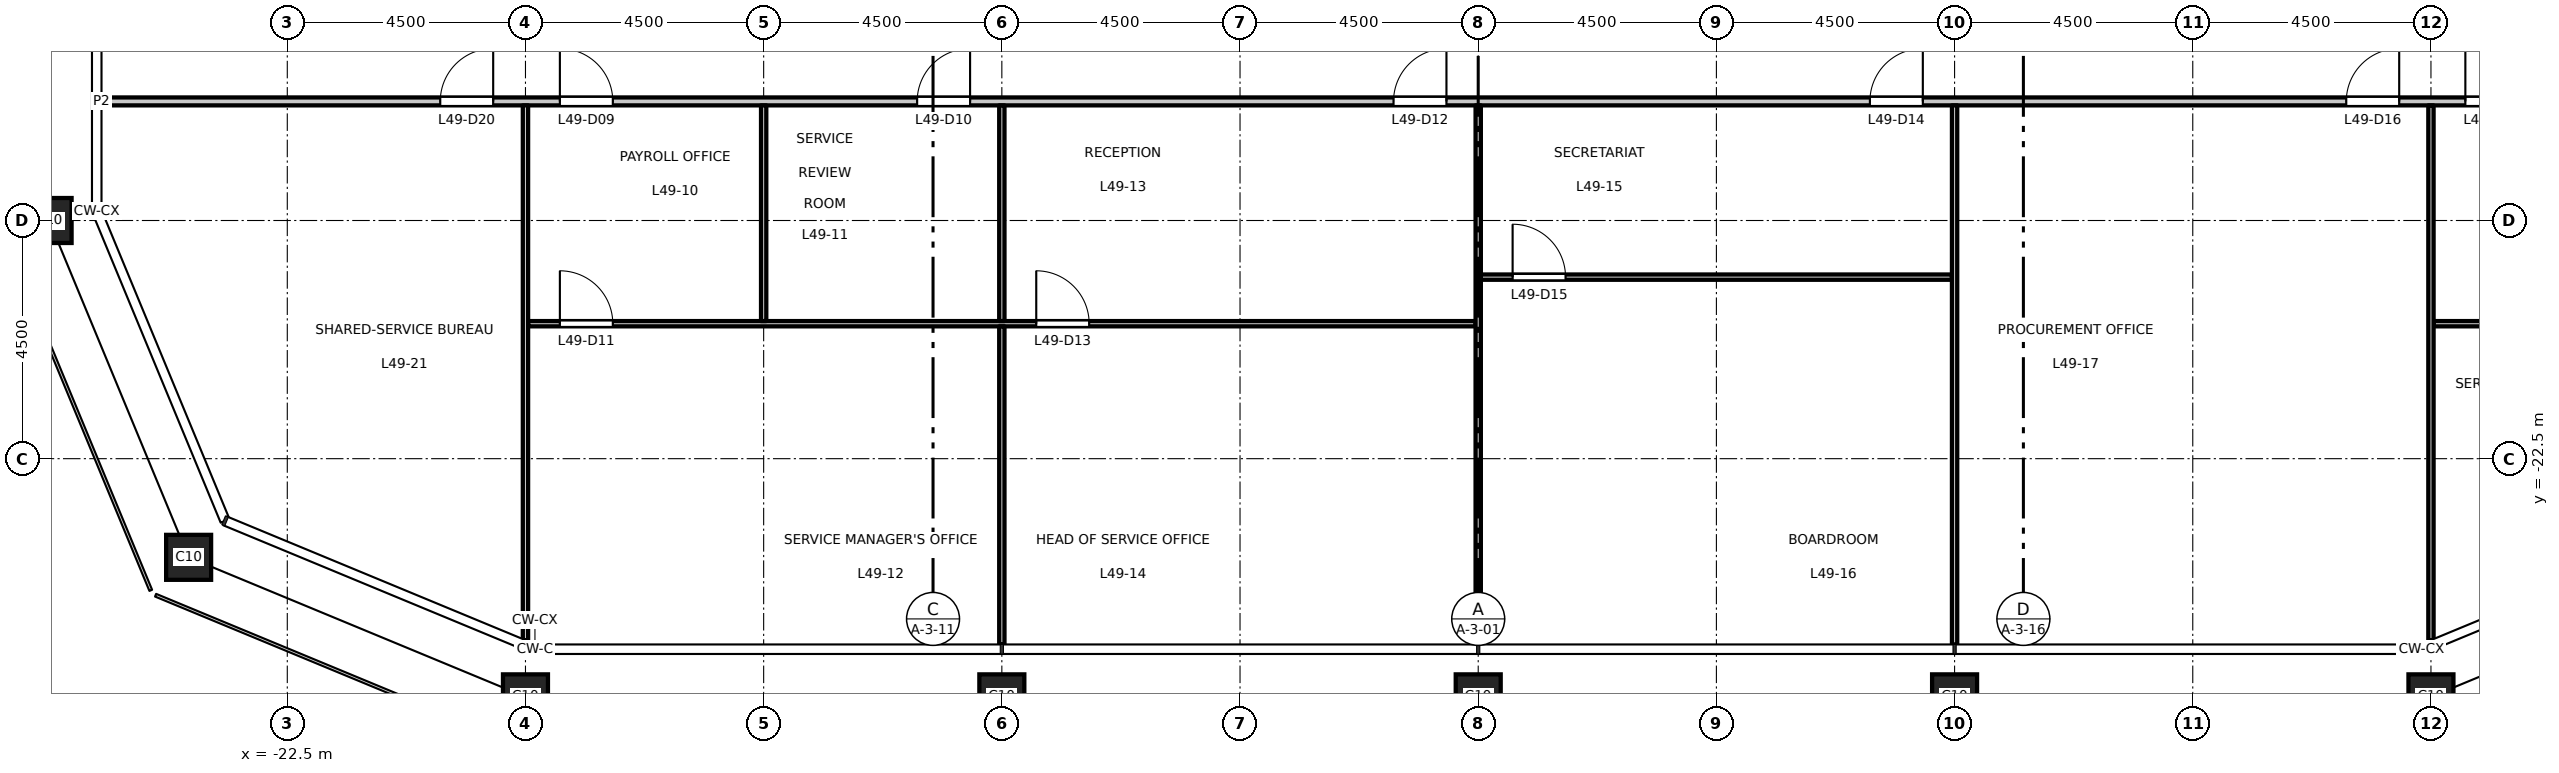
"""IFC4 building model, lengths in metres.
Left out: names, types, materials, properties, quantities, classifications, styles, units other than length and angle.
Written with IfcOpenShell. Run it as: python <this file> out.ifc"""

import sys

from ifc_helpers import new_model, si_unit, direction, frame, frame_2d, origin, origin_2d, place, context, subcontext, project, spatial, rectangle, hollow_rectangle, extrude, element, fill, save


model = new_model("IFC4")
c1 = context("Model", 3, precision=1e-05, world=origin(), true_north=direction((0.0, 1.0)))
c2 = subcontext(c1, "Body", "Model", "MODEL_VIEW")
j1 = project(units=[si_unit("LENGTHUNIT", "METRE"), si_unit("PLANEANGLEUNIT", "RADIAN")], contexts=[c1])
p1 = place(None, origin())
s1 = spatial("IfcSite", under=j1, at=p1, CompositionType="ELEMENT")
p2 = place(p1, origin())
s2 = spatial("IfcBuilding", under=s1, at=p2, CompositionType="ELEMENT")
p3 = place(p2, frame((0.0, 0.0, 228.7)))
s3 = spatial("IfcBuildingStorey", under=s2, at=p3, CompositionType="ELEMENT", Elevation=228.7)
for number, where, z_axis, x_axis in (
    (1, (-18.0, -27.0, 0.0), (0.0, 0.0, 1.0), (1.0, 0.0, 0.0)),
    (2, (-9.0, -27.0, 0.0), (0.0, 0.0, 1.0), (1.0, 0.0, 0.0)),
    (3, (0.0, -27.0, 0.0), (0.0, 0.0, 1.0), (1.0, 0.0, 0.0)),
    (4, (9.0, -27.0, 0.0), (0.0, 0.0, 1.0), (1.0, 0.0, 0.0)),
    (5, (18.0, -27.0, 0.0), (0.0, 0.0, 1.0), (1.0, 0.0, 0.0)),
    (6, (-27.0, -18.0, 0.0), (0.0, 0.0, 1.0), (1.0, 0.0, 0.0)),
    (7, (-24.364, -24.364, 0.0), (0.0, 0.0, 1.0), (1.0, 0.0, 0.0)),
):
    element("IfcColumn", number, at=place(p3, frame(where, z_axis=z_axis, x_axis=x_axis)), inside=s3, PredefinedType="COLUMN", context=c2, shape_type="SweptSolid", body=[
        extrude(hollow_rectangle(XDim=0.85, YDim=0.85, WallThickness=0.05, at=origin_2d()), origin(), (0.0, 0.0, 1.0), 4.5),
    ])
p4 = place(p3, frame((-17.95, -19.95, 0.0), z_axis=(0.0, 0.0, 1.0), x_axis=(1.0, 0.0, 0.0)))
e8 = element("IfcWall", 8, at=p4, inside=s3, PredefinedType="PARTITIONING", context=c2, shape_type="SweptSolid", body=[
    extrude(rectangle(XDim=17.9, YDim=0.1, at=frame_2d((8.95, 0.0))), origin(), (0.0, 0.0, 1.0), 4.35),
])
p5 = place(p4, frame((0.6, 0.0, 0.0)))
e9 = element("IfcOpeningElement", 9, at=p5, cuts=e8, PredefinedType="OPENING", context=c2, shape_type="SweptSolid", body=[
    extrude(rectangle(XDim=1.0, YDim=2.1, at=frame_2d((0.5, 1.05))), frame((0.0, 0.06, 0.0), z_axis=(0.0, -1.0, 0.0), x_axis=(1.0, 0.0, 0.0)), (0.0, 0.0, 1.0), 0.12),
])
p6 = place(p4, frame((9.6, 0.0, 0.0)))
e10 = element("IfcOpeningElement", 10, at=p6, cuts=e8, PredefinedType="OPENING", context=c2, shape_type="SweptSolid", body=[
    extrude(rectangle(XDim=1.0, YDim=2.1, at=frame_2d((0.5, 1.05))), frame((0.0, 0.06, 0.0), z_axis=(0.0, -1.0, 0.0), x_axis=(1.0, 0.0, 0.0)), (0.0, 0.0, 1.0), 0.12),
])
p7 = place(p3, frame((18.05, -19.95, 0.0), z_axis=(0.0, 0.0, 1.0), x_axis=(1.0, 0.0, 0.0)))
e11 = element("IfcWall", 11, at=p7, inside=s3, PredefinedType="PARTITIONING", context=c2, shape_type="SweptSolid", body=[
    extrude(rectangle(XDim=7.071, YDim=0.1, at=frame_2d((3.536, 0.0))), origin(), (0.0, 0.0, 1.0), 4.35),
])
p8 = place(p7, frame((5.35, 0.0, 0.0)))
e12 = element("IfcOpeningElement", 12, at=p8, cuts=e11, PredefinedType="OPENING", context=c2, shape_type="SweptSolid", body=[
    extrude(rectangle(XDim=1.0, YDim=2.1, at=frame_2d((0.5, 1.05))), frame((0.0, 0.06, 0.0), z_axis=(0.0, -1.0, 0.0), x_axis=(1.0, 0.0, 0.0)), (0.0, 0.0, 1.0), 0.12),
])
p9 = place(p3, frame((0.05, -19.07, 0.0), z_axis=(0.0, 0.0, 1.0), x_axis=(1.0, 0.0, 0.0)))
e13 = element("IfcWall", 13, at=p9, inside=s3, PredefinedType="PARTITIONING", context=c2, shape_type="SweptSolid", body=[
    extrude(rectangle(XDim=8.9, YDim=0.1, at=frame_2d((4.45, 0.0))), origin(), (0.0, 0.0, 1.0), 4.35),
])
p10 = place(p9, frame((0.6, 0.0, 0.0)))
e14 = element("IfcOpeningElement", 14, at=p10, cuts=e13, PredefinedType="OPENING", context=c2, shape_type="SweptSolid", body=[
    extrude(rectangle(XDim=1.0, YDim=2.1, at=frame_2d((0.5, 1.05))), frame((0.0, 0.06, 0.0), z_axis=(0.0, -1.0, 0.0), x_axis=(1.0, 0.0, 0.0)), (0.0, 0.0, 1.0), 0.12),
])
p11 = place(p3, frame((-26.01, -15.75, 0.0), z_axis=(0.0, 0.0, 1.0), x_axis=(1.0, 0.0, 0.0)))
e15 = element("IfcWall", 15, at=p11, inside=s3, PredefinedType="PARTITIONING", context=c2, shape_type="SweptSolid", body=[
    extrude(rectangle(XDim=52.02, YDim=0.15, at=frame_2d((26.01, 0.0))), origin(), (0.0, 0.0, 1.0), 4.35),
])
p12 = place(p11, frame((8.66, 0.0, 0.0)))
e16 = element("IfcOpeningElement", 16, at=p12, cuts=e15, PredefinedType="OPENING", context=c2, shape_type="SweptSolid", body=[
    extrude(rectangle(XDim=1.0, YDim=2.1, at=frame_2d((0.5, 1.05))), frame((0.0, 0.085, 0.0), z_axis=(0.0, -1.0, 0.0), x_axis=(1.0, 0.0, 0.0)), (0.0, 0.0, 1.0), 0.17),
])
p13 = place(p11, frame((15.41, 0.0, 0.0)))
e17 = element("IfcOpeningElement", 17, at=p13, cuts=e15, PredefinedType="OPENING", context=c2, shape_type="SweptSolid", body=[
    extrude(rectangle(XDim=1.0, YDim=2.1, at=frame_2d((0.5, 1.05))), frame((0.0, 0.085, 0.0), z_axis=(0.0, -1.0, 0.0), x_axis=(1.0, 0.0, 0.0)), (0.0, 0.0, 1.0), 0.17),
])
p14 = place(p11, frame((24.41, 0.0, 0.0)))
e18 = element("IfcOpeningElement", 18, at=p14, cuts=e15, PredefinedType="OPENING", context=c2, shape_type="SweptSolid", body=[
    extrude(rectangle(XDim=1.0, YDim=2.1, at=frame_2d((0.5, 1.05))), frame((0.0, 0.085, 0.0), z_axis=(0.0, -1.0, 0.0), x_axis=(1.0, 0.0, 0.0)), (0.0, 0.0, 1.0), 0.17),
])
p15 = place(p11, frame((33.41, 0.0, 0.0)))
e19 = element("IfcOpeningElement", 19, at=p15, cuts=e15, PredefinedType="OPENING", context=c2, shape_type="SweptSolid", body=[
    extrude(rectangle(XDim=1.0, YDim=2.1, at=frame_2d((0.5, 1.05))), frame((0.0, 0.085, 0.0), z_axis=(0.0, -1.0, 0.0), x_axis=(1.0, 0.0, 0.0)), (0.0, 0.0, 1.0), 0.17),
])
p16 = place(p11, frame((42.41, 0.0, 0.0)))
e20 = element("IfcOpeningElement", 20, at=p16, cuts=e15, PredefinedType="OPENING", context=c2, shape_type="SweptSolid", body=[
    extrude(rectangle(XDim=1.0, YDim=2.1, at=frame_2d((0.5, 1.05))), frame((0.0, 0.085, 0.0), z_axis=(0.0, -1.0, 0.0), x_axis=(1.0, 0.0, 0.0)), (0.0, 0.0, 1.0), 0.17),
])
p17 = place(p11, frame((6.4, 0.0, 0.0)))
e21 = element("IfcOpeningElement", 21, at=p17, cuts=e15, PredefinedType="OPENING", context=c2, shape_type="SweptSolid", body=[
    extrude(rectangle(XDim=1.0, YDim=2.1, at=frame_2d((0.5, 1.05))), frame((0.0, 0.085, 0.0), z_axis=(0.0, -1.0, 0.0), x_axis=(1.0, 0.0, 0.0)), (0.0, 0.0, 1.0), 0.17),
])
p18 = place(p11, frame((44.66, 0.0, 0.0)))
e22 = element("IfcOpeningElement", 22, at=p18, cuts=e15, PredefinedType="OPENING", context=c2, shape_type="SweptSolid", body=[
    extrude(rectangle(XDim=1.0, YDim=2.1, at=frame_2d((0.5, 1.05))), frame((0.0, 0.085, 0.0), z_axis=(0.0, -1.0, 0.0), x_axis=(1.0, 0.0, 0.0)), (0.0, 0.0, 1.0), 0.17),
])
p19 = place(p3, frame((-18.0, -25.928, 0.0), z_axis=(0.0, 0.0, 1.0), x_axis=(0.0, 1.0, 0.0)))
e23 = element("IfcWall", 23, at=p19, inside=s3, PredefinedType="PARTITIONING", context=c2, shape_type="SweptSolid", body=[
    extrude(rectangle(XDim=10.103, YDim=0.1, at=frame_2d((5.052, 0.0))), origin(), (0.0, 0.0, 1.0), 3.65),
])
p20 = place(p3, frame((-13.5, -19.9, 0.0), z_axis=(0.0, 0.0, 1.0), x_axis=(0.0, 1.0, 0.0)))
e24 = element("IfcWall", 24, at=p20, inside=s3, PredefinedType="PARTITIONING", context=c2, shape_type="SweptSolid", body=[
    extrude(rectangle(XDim=4.075, YDim=0.1, at=frame_2d((2.038, 0.0))), origin(), (0.0, 0.0, 1.0), 4.35),
])
p21 = place(p3, frame((-9.0, -26.01, 0.0), z_axis=(0.0, 0.0, 1.0), x_axis=(0.0, 1.0, 0.0)))
e25 = element("IfcWall", 25, at=p21, inside=s3, PredefinedType="PARTITIONING", context=c2, shape_type="SweptSolid", body=[
    extrude(rectangle(XDim=6.01, YDim=0.1, at=frame_2d((3.005, 0.0))), origin(), (0.0, 0.0, 1.0), 3.65),
])
p22 = place(p3, frame((-9.0, -19.9, 0.0), z_axis=(0.0, 0.0, 1.0), x_axis=(0.0, 1.0, 0.0)))
e26 = element("IfcWall", 26, at=p22, inside=s3, PredefinedType="PARTITIONING", context=c2, shape_type="SweptSolid", body=[
    extrude(rectangle(XDim=4.075, YDim=0.1, at=frame_2d((2.038, 0.0))), origin(), (0.0, 0.0, 1.0), 3.65),
])
p23 = place(p3, frame((0.0, -26.01, 0.0), z_axis=(0.0, 0.0, 1.0), x_axis=(0.0, 1.0, 0.0)))
e27 = element("IfcWall", 27, at=p23, inside=s3, PredefinedType="PARTITIONING", context=c2, shape_type="SweptSolid", body=[
    extrude(rectangle(XDim=10.185, YDim=0.1, at=frame_2d((5.093, 0.0))), origin(), (0.0, 0.0, 1.0), 3.55),
])
p24 = place(p3, frame((9.0, -26.01, 0.0), z_axis=(0.0, 0.0, 1.0), x_axis=(0.0, 1.0, 0.0)))
e28 = element("IfcWall", 28, at=p24, inside=s3, PredefinedType="PARTITIONING", context=c2, shape_type="SweptSolid", body=[
    extrude(rectangle(XDim=10.185, YDim=0.1, at=frame_2d((5.093, 0.0))), origin(), (0.0, 0.0, 1.0), 3.65),
])
p25 = place(p3, frame((18.0, -25.928, 0.0), z_axis=(0.0, 0.0, 1.0), x_axis=(0.0, 1.0, 0.0)))
e29 = element("IfcWall", 29, at=p25, inside=s3, PredefinedType="PARTITIONING", context=c2, shape_type="SweptSolid", body=[
    extrude(rectangle(XDim=10.103, YDim=0.1, at=frame_2d((5.052, 0.0))), origin(), (0.0, 0.0, 1.0), 3.65),
])
p26 = place(p12, origin())
e30 = element("IfcDoor", 30, at=p26, inside=s3, OperationType="SINGLE_SWING_LEFT", PredefinedType="DOOR", context=c2, shape_type="SweptSolid", body=[
    extrude(rectangle(XDim=1.0, YDim=2.1, at=frame_2d((0.5, 1.05))), frame((0.0, 0.025, 0.0), z_axis=(0.0, -1.0, 0.0), x_axis=(1.0, 0.0, 0.0)), (0.0, 0.0, 1.0), 0.05),
])
fill(e16, e30)
p27 = place(p13, origin())
e31 = element("IfcDoor", 31, at=p27, inside=s3, OperationType="SINGLE_SWING_RIGHT", PredefinedType="DOOR", context=c2, shape_type="SweptSolid", body=[
    extrude(rectangle(XDim=1.0, YDim=2.1, at=frame_2d((0.5, 1.05))), frame((0.0, 0.025, 0.0), z_axis=(0.0, -1.0, 0.0), x_axis=(1.0, 0.0, 0.0)), (0.0, 0.0, 1.0), 0.05),
])
fill(e17, e31)
p28 = place(p5, origin())
e32 = element("IfcDoor", 32, at=p28, inside=s3, OperationType="SINGLE_SWING_LEFT", PredefinedType="DOOR", context=c2, shape_type="SweptSolid", body=[
    extrude(rectangle(XDim=1.0, YDim=2.1, at=frame_2d((0.5, 1.05))), frame((0.0, 0.025, 0.0), z_axis=(0.0, -1.0, 0.0), x_axis=(1.0, 0.0, 0.0)), (0.0, 0.0, 1.0), 0.05),
])
fill(e9, e32)
p29 = place(p14, origin())
e33 = element("IfcDoor", 33, at=p29, inside=s3, OperationType="SINGLE_SWING_RIGHT", PredefinedType="DOOR", context=c2, shape_type="SweptSolid", body=[
    extrude(rectangle(XDim=1.0, YDim=2.1, at=frame_2d((0.5, 1.05))), frame((0.0, 0.025, 0.0), z_axis=(0.0, -1.0, 0.0), x_axis=(1.0, 0.0, 0.0)), (0.0, 0.0, 1.0), 0.05),
])
fill(e18, e33)
p30 = place(p6, origin())
e34 = element("IfcDoor", 34, at=p30, inside=s3, OperationType="SINGLE_SWING_LEFT", PredefinedType="DOOR", context=c2, shape_type="SweptSolid", body=[
    extrude(rectangle(XDim=1.0, YDim=2.1, at=frame_2d((0.5, 1.05))), frame((0.0, 0.025, 0.0), z_axis=(0.0, -1.0, 0.0), x_axis=(1.0, 0.0, 0.0)), (0.0, 0.0, 1.0), 0.05),
])
fill(e10, e34)
p31 = place(p15, origin())
e35 = element("IfcDoor", 35, at=p31, inside=s3, OperationType="SINGLE_SWING_RIGHT", PredefinedType="DOOR", context=c2, shape_type="SweptSolid", body=[
    extrude(rectangle(XDim=1.0, YDim=2.1, at=frame_2d((0.5, 1.05))), frame((0.0, 0.025, 0.0), z_axis=(0.0, -1.0, 0.0), x_axis=(1.0, 0.0, 0.0)), (0.0, 0.0, 1.0), 0.05),
])
fill(e19, e35)
p32 = place(p10, origin())
e36 = element("IfcDoor", 36, at=p32, inside=s3, OperationType="SINGLE_SWING_LEFT", PredefinedType="DOOR", context=c2, shape_type="SweptSolid", body=[
    extrude(rectangle(XDim=1.0, YDim=2.1, at=frame_2d((0.5, 1.05))), frame((0.0, 0.025, 0.0), z_axis=(0.0, -1.0, 0.0), x_axis=(1.0, 0.0, 0.0)), (0.0, 0.0, 1.0), 0.05),
])
fill(e14, e36)
p33 = place(p16, origin())
e37 = element("IfcDoor", 37, at=p33, inside=s3, OperationType="SINGLE_SWING_RIGHT", PredefinedType="DOOR", context=c2, shape_type="SweptSolid", body=[
    extrude(rectangle(XDim=1.0, YDim=2.1, at=frame_2d((0.5, 1.05))), frame((0.0, 0.025, 0.0), z_axis=(0.0, -1.0, 0.0), x_axis=(1.0, 0.0, 0.0)), (0.0, 0.0, 1.0), 0.05),
])
fill(e20, e37)
p34 = place(p17, origin())
e38 = element("IfcDoor", 38, at=p34, inside=s3, OperationType="SINGLE_SWING_RIGHT", PredefinedType="DOOR", context=c2, shape_type="SweptSolid", body=[
    extrude(rectangle(XDim=1.0, YDim=2.1, at=frame_2d((0.5, 1.05))), frame((0.0, 0.025, 0.0), z_axis=(0.0, -1.0, 0.0), x_axis=(1.0, 0.0, 0.0)), (0.0, 0.0, 1.0), 0.05),
])
fill(e21, e38)
p35 = place(p18, origin())
e39 = element("IfcDoor", 39, at=p35, inside=s3, OperationType="SINGLE_SWING_LEFT", PredefinedType="DOOR", context=c2, shape_type="SweptSolid", body=[
    extrude(rectangle(XDim=1.0, YDim=2.1, at=frame_2d((0.5, 1.05))), frame((0.0, 0.025, 0.0), z_axis=(0.0, -1.0, 0.0), x_axis=(1.0, 0.0, 0.0)), (0.0, 0.0, 1.0), 0.05),
])
fill(e22, e39)
save(model, sys.argv[1])
